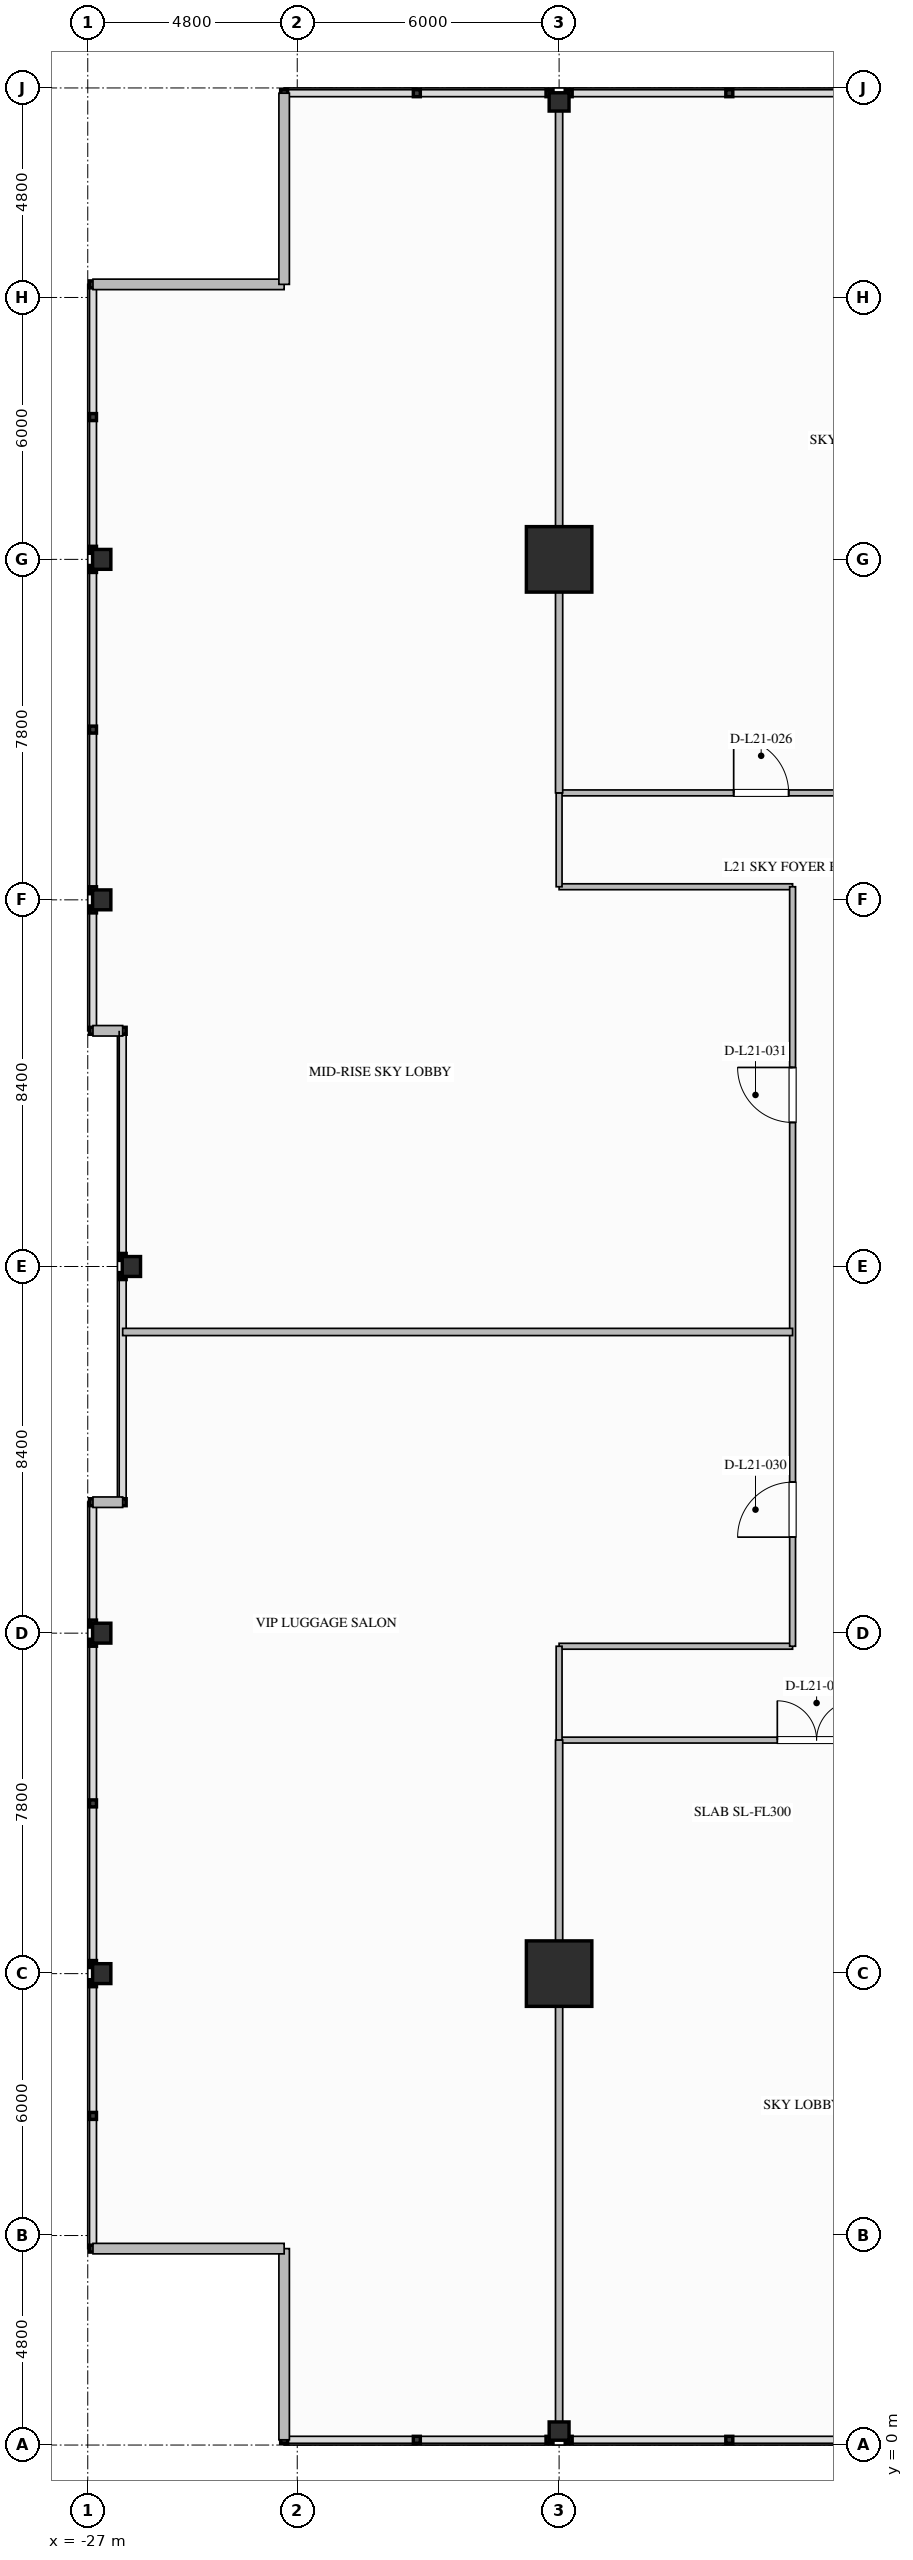
"""IFC4 building model, lengths in metres.
Left out: names, types, materials, properties, quantities, classifications, styles, units other than length and angle.
Written with IfcOpenShell. Run it as: python <this file> out.ifc"""

import sys

from ifc_helpers import new_model, si_unit, direction, frame, frame_2d, origin, origin_2d, place, context, subcontext, project, spatial, rectangle, i_section, extrude, element, fill, save


model = new_model("IFC4")
c1 = context("Model", 3, precision=1e-05, world=origin(), true_north=direction((0.0, 1.0)))
c2 = subcontext(c1, "Body", "Model", "MODEL_VIEW")
j1 = project(units=[si_unit("LENGTHUNIT", "METRE"), si_unit("PLANEANGLEUNIT", "RADIAN")], contexts=[c1])
p1 = place(None, origin())
s1 = spatial("IfcSite", under=j1, at=p1, CompositionType="ELEMENT")
p2 = place(p1, origin())
s2 = spatial("IfcBuilding", under=s1, at=p2, CompositionType="ELEMENT")
p3 = place(p2, frame((0.0, 0.0, 87.2)))
s3 = spatial("IfcBuildingStorey", under=s2, at=p3, CompositionType="ELEMENT", Elevation=87.2)
for number, where, z_axis, x_axis in (
    (1, (-16.2, 10.8, 0.0), (0.0, 0.0, 1.0), (1.0, 0.0, 0.0)),
    (2, (-16.2, 43.2, 0.0), (0.0, 0.0, 1.0), (1.0, 0.0, 0.0)),
):
    element("IfcColumn", number, at=place(p3, frame(where, z_axis=z_axis, x_axis=x_axis)), inside=s3, PredefinedType="COLUMN", context=c2, shape_type="SweptSolid", body=[
        extrude(rectangle(XDim=1.5, YDim=1.5, at=origin_2d()), origin(), (0.0, 0.0, 1.0), 4.6),
    ])
for number, where, z_axis, x_axis in (
    (3, (-26.68, 10.8, 0.0), (0.0, 0.0, 1.0), (1.0, 0.0, 0.0)),
    (4, (-26.68, 18.6, 0.0), (0.0, 0.0, 1.0), (1.0, 0.0, 0.0)),
    (5, (-26.0, 27.0, 0.0), (0.0, 0.0, 1.0), (1.0, 0.0, 0.0)),
    (6, (-26.68, 35.4, 0.0), (0.0, 0.0, 1.0), (1.0, 0.0, 0.0)),
    (7, (-26.68, 43.2, 0.0), (0.0, 0.0, 1.0), (1.0, 0.0, 0.0)),
    (8, (-16.2, 0.32, 0.0), (0.0, 0.0, 1.0), (0.0, 1.0, 0.0)),
    (9, (-16.2, 53.68, 0.0), (0.0, 0.0, 1.0), (0.0, 1.0, 0.0)),
):
    element("IfcColumn", number, at=place(p3, frame(where, z_axis=z_axis, x_axis=x_axis)), inside=s3, PredefinedType="COLUMN", context=c2, shape_type="SweptSolid", body=[
        extrude(i_section(OverallWidth=0.418, OverallDepth=0.455, WebThickness=0.042, FlangeThickness=0.068, FilletRadius=0.03, at=origin_2d()), origin(), (0.0, 0.0, 1.0), 4.597),
    ])
for number, where, z_axis, x_axis in (
    (10, (-22.5, 0.12, 0.0), (0.0, 0.0, 1.0), (0.0, 1.0, 0.0)),
    (11, (-22.5, 4.5, 0.0), (0.0, 0.0, 1.0), (-1.0, 0.0, 0.0)),
    (12, (-26.88, 49.5, 0.0), (0.0, 0.0, 1.0), (1.0, 0.0, 0.0)),
    (13, (-22.5, 49.5, 0.0), (0.0, 0.0, 1.0), (0.0, 1.0, 0.0)),
):
    element("IfcWall", number, at=place(p3, frame(where, z_axis=z_axis, x_axis=x_axis)), inside=s3, PredefinedType="STANDARD", context=c2, shape_type="SweptSolid", body=[
        extrude(rectangle(XDim=4.38, YDim=0.24, at=frame_2d((2.19, 0.0))), origin(), (0.0, 0.0, 1.0), 4.34),
    ])
for number, where, z_axis, x_axis in (
    (14, (-26.88, 21.6, 0.0), (0.0, 0.0, 1.0), (1.0, 0.0, 0.0)),
    (15, (-26.2, 32.4, 0.0), (0.0, 0.0, 1.0), (-1.0, 0.0, 0.0)),
):
    element("IfcWall", number, at=place(p3, frame(where, z_axis=z_axis, x_axis=x_axis)), inside=s3, PredefinedType="STANDARD", context=c2, shape_type="SweptSolid", body=[
        extrude(rectangle(XDim=0.68, YDim=0.24, at=frame_2d((0.34, 0.0))), origin(), (0.0, 0.0, 1.0), 4.34),
    ])
p4 = place(p3, frame((-16.2, 16.15, 0.0), z_axis=(0.0, 0.0, 1.0), x_axis=(1.0, 0.0, 0.0)))
e16 = element("IfcWall", 16, at=p4, inside=s3, PredefinedType="PARTITIONING", context=c2, shape_type="SweptSolid", body=[
    extrude(rectangle(XDim=32.4, YDim=0.135, at=frame_2d((16.2, 0.0))), origin(), (0.0, 0.0, 1.0), 4.34),
])
p5 = place(p4, frame((5.0, 0.0, 0.0)))
e17 = element("IfcOpeningElement", 17, at=p5, cuts=e16, PredefinedType="OPENING", context=c2, shape_type="SweptSolid", body=[
    extrude(rectangle(XDim=1.8, YDim=2.35, at=frame_2d((0.9, 1.175))), frame((0.0, 0.077, 0.0), z_axis=(0.0, -1.0, 0.0), x_axis=(1.0, 0.0, 0.0)), (0.0, 0.0, 1.0), 0.155),
])
p6 = place(p4, frame((23.0, 0.0, 0.0)))
e18 = element("IfcOpeningElement", 18, at=p6, cuts=e16, PredefinedType="OPENING", context=c2, shape_type="SweptSolid", body=[
    extrude(rectangle(XDim=1.8, YDim=2.35, at=frame_2d((0.9, 1.175))), frame((0.0, 0.077, 0.0), z_axis=(0.0, -1.0, 0.0), x_axis=(1.0, 0.0, 0.0)), (0.0, 0.0, 1.0), 0.155),
])
p7 = place(p3, frame((-16.2, 37.85, 0.0), z_axis=(0.0, 0.0, 1.0), x_axis=(1.0, 0.0, 0.0)))
e19 = element("IfcWall", 19, at=p7, inside=s3, PredefinedType="PARTITIONING", context=c2, shape_type="SweptSolid", body=[
    extrude(rectangle(XDim=32.4, YDim=0.135, at=frame_2d((16.2, 0.0))), origin(), (0.0, 0.0, 1.0), 4.34),
])
p8 = place(p7, frame((4.0, 0.0, 0.0)))
e20 = element("IfcOpeningElement", 20, at=p8, cuts=e19, PredefinedType="OPENING", context=c2, shape_type="SweptSolid", body=[
    extrude(rectangle(XDim=1.26, YDim=2.2, at=frame_2d((0.63, 1.1))), frame((0.0, 0.077, 0.0), z_axis=(0.0, -1.0, 0.0), x_axis=(1.0, 0.0, 0.0)), (0.0, 0.0, 1.0), 0.155),
])
p9 = place(p7, frame((17.5, 0.0, 0.0)))
e21 = element("IfcOpeningElement", 21, at=p9, cuts=e19, PredefinedType="OPENING", context=c2, shape_type="SweptSolid", body=[
    extrude(rectangle(XDim=1.26, YDim=2.2, at=frame_2d((0.63, 1.1))), frame((0.0, 0.077, 0.0), z_axis=(0.0, -1.0, 0.0), x_axis=(1.0, 0.0, 0.0)), (0.0, 0.0, 1.0), 0.155),
])
p10 = place(p7, frame((25.5, 0.0, 0.0)))
e22 = element("IfcOpeningElement", 22, at=p10, cuts=e19, PredefinedType="OPENING", context=c2, shape_type="SweptSolid", body=[
    extrude(rectangle(XDim=0.92, YDim=2.1, at=frame_2d((0.46, 1.05))), frame((0.0, 0.077, 0.0), z_axis=(0.0, -1.0, 0.0), x_axis=(1.0, 0.0, 0.0)), (0.0, 0.0, 1.0), 0.155),
])
p11 = place(p7, frame((29.7, 0.0, 0.0)))
e23 = element("IfcOpeningElement", 23, at=p11, cuts=e19, PredefinedType="OPENING", context=c2, shape_type="SweptSolid", body=[
    extrude(rectangle(XDim=0.98, YDim=2.1, at=frame_2d((0.49, 1.05))), frame((0.0, 0.077, 0.0), z_axis=(0.0, -1.0, 0.0), x_axis=(1.0, 0.0, 0.0)), (0.0, 0.0, 1.0), 0.155),
])
for number, where, z_axis, x_axis in (
    (24, (-16.2, 18.3, 0.0), (0.0, 0.0, 1.0), (1.0, 0.0, 0.0)),
    (25, (-16.2, 35.7, 0.0), (0.0, 0.0, 1.0), (1.0, 0.0, 0.0)),
):
    element("IfcWall", number, at=place(p3, frame(where, z_axis=z_axis, x_axis=x_axis)), inside=s3, PredefinedType="PARTITIONING", context=c2, shape_type="SweptSolid", body=[
        extrude(rectangle(XDim=5.35, YDim=0.135, at=frame_2d((2.675, 0.0))), origin(), (0.0, 0.0, 1.0), 4.34),
    ])
p12 = place(p3, frame((-10.85, 18.3, 0.0), z_axis=(0.0, 0.0, 1.0), x_axis=(0.0, 1.0, 0.0)))
e26 = element("IfcWall", 26, at=p12, inside=s3, PredefinedType="PARTITIONING", context=c2, shape_type="SweptSolid", body=[
    extrude(rectangle(XDim=17.4, YDim=0.135, at=frame_2d((8.7, 0.0))), origin(), (0.0, 0.0, 1.0), 4.34),
])
p13 = place(p12, frame((2.5, 0.0, 0.0)))
e27 = element("IfcOpeningElement", 27, at=p13, cuts=e26, PredefinedType="OPENING", context=c2, shape_type="SweptSolid", body=[
    extrude(rectangle(XDim=1.26, YDim=2.2, at=frame_2d((0.63, 1.1))), frame((0.0, 0.077, 0.0), z_axis=(0.0, -1.0, 0.0), x_axis=(1.0, 0.0, 0.0)), (0.0, 0.0, 1.0), 0.155),
])
p14 = place(p12, frame((12.0, 0.0, 0.0)))
e28 = element("IfcOpeningElement", 28, at=p14, cuts=e26, PredefinedType="OPENING", context=c2, shape_type="SweptSolid", body=[
    extrude(rectangle(XDim=1.26, YDim=2.2, at=frame_2d((0.63, 1.1))), frame((0.0, 0.077, 0.0), z_axis=(0.0, -1.0, 0.0), x_axis=(1.0, 0.0, 0.0)), (0.0, 0.0, 1.0), 0.155),
])
for number, where, z_axis, x_axis in (
    (29, (-16.2, 16.15, 0.0), (0.0, 0.0, 1.0), (0.0, 1.0, 0.0)),
    (30, (-16.2, 35.7, 0.0), (0.0, 0.0, 1.0), (0.0, 1.0, 0.0)),
):
    element("IfcWall", number, at=place(p3, frame(where, z_axis=z_axis, x_axis=x_axis)), inside=s3, PredefinedType="PARTITIONING", context=c2, shape_type="SweptSolid", body=[
        extrude(rectangle(XDim=2.15, YDim=0.135, at=frame_2d((1.075, 0.0))), origin(), (0.0, 0.0, 1.0), 3.552),
    ])
for number, where, z_axis, x_axis in (
    (31, (-16.2, 0.12, 0.0), (0.0, 0.0, 1.0), (0.0, 1.0, 0.0)),
    (32, (-16.2, 37.85, 0.0), (0.0, 0.0, 1.0), (0.0, 1.0, 0.0)),
):
    element("IfcWall", number, at=place(p3, frame(where, z_axis=z_axis, x_axis=x_axis)), inside=s3, PredefinedType="PARTITIONING", context=c2, shape_type="SweptSolid", body=[
        extrude(rectangle(XDim=16.03, YDim=0.165, at=frame_2d((8.015, 0.0))), origin(), (0.0, 0.0, 1.0), 3.552),
    ])
p15 = place(p3, frame((-26.2, 25.5, 0.0), z_axis=(0.0, 0.0, 1.0), x_axis=(1.0, 0.0, 0.0)))
e33 = element("IfcWall", 33, at=p15, inside=s3, PredefinedType="PARTITIONING", context=c2, shape_type="SweptSolid", body=[
    extrude(rectangle(XDim=15.35, YDim=0.165, at=frame_2d((7.675, 0.0))), origin(), (0.0, 0.0, 1.0), 4.34),
])
p16 = place(p5, origin())
e34 = element("IfcDoor", 34, at=p16, inside=s3, OperationType="DOUBLE_DOOR_SINGLE_SWING", PredefinedType="DOOR", context=c2, shape_type="SweptSolid", body=[
    extrude(rectangle(XDim=1.8, YDim=2.35, at=frame_2d((0.9, 1.175))), frame((0.0, 0.025, 0.0), z_axis=(0.0, -1.0, 0.0), x_axis=(1.0, 0.0, 0.0)), (0.0, 0.0, 1.0), 0.05),
])
fill(e17, e34)
p17 = place(p8, origin())
e35 = element("IfcDoor", 35, at=p17, inside=s3, OperationType="SINGLE_SWING_LEFT", PredefinedType="DOOR", context=c2, shape_type="SweptSolid", body=[
    extrude(rectangle(XDim=1.26, YDim=2.2, at=frame_2d((0.63, 1.1))), frame((0.0, 0.025, 0.0), z_axis=(0.0, -1.0, 0.0), x_axis=(1.0, 0.0, 0.0)), (0.0, 0.0, 1.0), 0.05),
])
fill(e20, e35)
p18 = place(p13, origin())
e36 = element("IfcDoor", 36, at=p18, inside=s3, OperationType="SINGLE_SWING_LEFT", PredefinedType="DOOR", context=c2, shape_type="SweptSolid", body=[
    extrude(rectangle(XDim=1.26, YDim=2.2, at=frame_2d((0.63, 1.1))), frame((0.0, 0.025, 0.0), z_axis=(0.0, -1.0, 0.0), x_axis=(1.0, 0.0, 0.0)), (0.0, 0.0, 1.0), 0.05),
])
fill(e27, e36)
p19 = place(p14, origin())
e37 = element("IfcDoor", 37, at=p19, inside=s3, OperationType="SINGLE_SWING_RIGHT", PredefinedType="DOOR", context=c2, shape_type="SweptSolid", body=[
    extrude(rectangle(XDim=1.26, YDim=2.2, at=frame_2d((0.63, 1.1))), frame((0.0, 0.025, 0.0), z_axis=(0.0, -1.0, 0.0), x_axis=(1.0, 0.0, 0.0)), (0.0, 0.0, 1.0), 0.05),
])
fill(e28, e37)
save(model, sys.argv[1])
